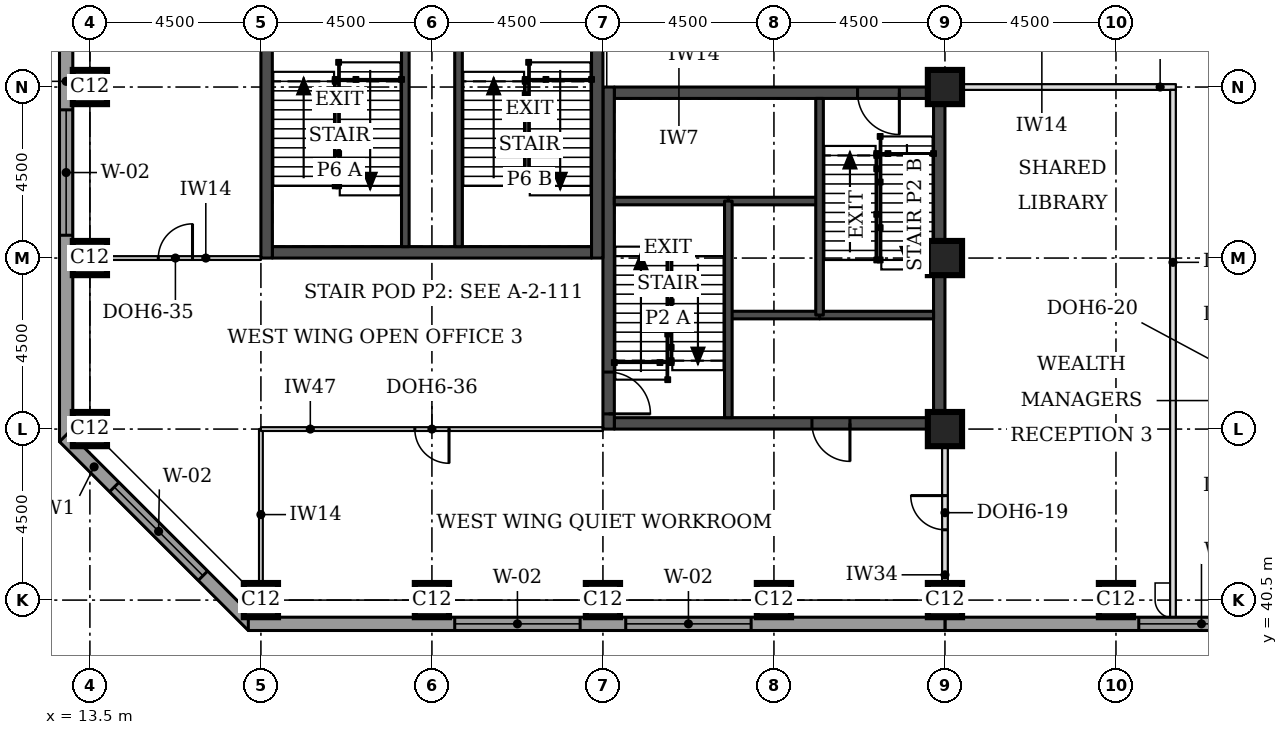
"""IFC4 building model, lengths in metres.
Left out: names, types, materials, properties, quantities, classifications, styles, units other than length and angle.
Written with IfcOpenShell. Run it as: python <this file> out.ifc"""

import sys

from ifc_helpers import new_model, si_unit, direction, frame, frame_2d, origin, origin_2d, place, context, subcontext, project, spatial, rectangle, extrude, element, fill, save


model = new_model("IFC4")
c1 = context("Model", 3, precision=1e-05, world=origin(), true_north=direction((0.0, 1.0)))
c2 = subcontext(c1, "Body", "Model", "MODEL_VIEW")
j1 = project(units=[si_unit("LENGTHUNIT", "METRE"), si_unit("PLANEANGLEUNIT", "RADIAN")], contexts=[c1])
p1 = place(None, origin())
s1 = spatial("IfcSite", under=j1, at=p1, CompositionType="ELEMENT")
p2 = place(p1, origin())
s2 = spatial("IfcBuilding", under=s1, at=p2, CompositionType="ELEMENT")
p3 = place(p2, frame((0.0, 0.0, 184.7)))
s3 = spatial("IfcBuildingStorey", under=s2, at=p3, CompositionType="ELEMENT", Elevation=184.7)
for number, where, z_axis, x_axis in (
    (1, (18.0, 40.5, 0.0), (0.0, 0.0, 1.0), (1.0, 0.0, 0.0)),
    (2, (22.5, 40.5, 0.0), (0.0, 0.0, 1.0), (1.0, 0.0, 0.0)),
    (3, (27.0, 40.5, 0.0), (0.0, 0.0, 1.0), (1.0, 0.0, 0.0)),
    (4, (31.5, 40.5, 0.0), (0.0, 0.0, 1.0), (1.0, 0.0, 0.0)),
    (5, (36.0, 40.5, 0.0), (0.0, 0.0, 1.0), (1.0, 0.0, 0.0)),
    (6, (40.5, 40.5, 0.0), (0.0, 0.0, 1.0), (1.0, 0.0, 0.0)),
    (7, (13.5, 45.0, 0.0), (0.0, 0.0, 1.0), (1.0, 0.0, 0.0)),
    (8, (36.0, 45.0, 0.0), (0.0, 0.0, 1.0), (1.0, 0.0, 0.0)),
    (9, (13.5, 49.5, 0.0), (0.0, 0.0, 1.0), (1.0, 0.0, 0.0)),
    (10, (36.0, 49.5, 0.0), (0.0, 0.0, 1.0), (1.0, 0.0, 0.0)),
    (11, (13.5, 54.0, 0.0), (0.0, 0.0, 1.0), (1.0, 0.0, 0.0)),
    (12, (36.0, 54.0, 0.0), (0.0, 0.0, 1.0), (1.0, 0.0, 0.0)),
):
    element("IfcColumn", number, at=place(p3, frame(where, z_axis=z_axis, x_axis=x_axis)), inside=s3, PredefinedType="COLUMN", context=c2, shape_type="SweptSolid", body=[
        extrude(rectangle(XDim=0.9, YDim=0.9, at=origin_2d()), origin(), (0.0, 0.0, 1.0), 3.7),
    ])
p4 = place(p3, frame((27.3, 45.15, 0.0), z_axis=(0.0, 0.0, 1.0), x_axis=(1.0, 0.0, 0.0)))
e13 = element("IfcWall", 13, at=p4, inside=s3, PredefinedType="SHEAR", context=c2, shape_type="SweptSolid", body=[
    extrude(rectangle(XDim=8.4, YDim=0.3, at=frame_2d((4.2, 0.0))), origin(), (0.0, 0.0, 1.0), 3.7),
])
p5 = place(p4, frame((5.2, 0.0, 0.0)))
e14 = element("IfcOpeningElement", 14, at=p5, cuts=e13, PredefinedType="OPENING", context=c2, shape_type="SweptSolid", body=[
    extrude(rectangle(XDim=1.0, YDim=2.1, at=frame_2d((0.5, 1.05))), frame((0.0, 0.16, 0.0), z_axis=(0.0, -1.0, 0.0), x_axis=(1.0, 0.0, 0.0)), (0.0, 0.0, 1.0), 0.32),
])
p6 = place(p3, frame((27.3, 53.85, 0.0), z_axis=(0.0, 0.0, 1.0), x_axis=(1.0, 0.0, 0.0)))
e15 = element("IfcWall", 15, at=p6, inside=s3, PredefinedType="SHEAR", context=c2, shape_type="SweptSolid", body=[
    extrude(rectangle(XDim=8.4, YDim=0.3, at=frame_2d((4.2, 0.0))), origin(), (0.0, 0.0, 1.0), 3.7),
])
p7 = place(p6, frame((6.4, 0.0, 0.0)))
e16 = element("IfcOpeningElement", 16, at=p7, cuts=e15, PredefinedType="OPENING", context=c2, shape_type="SweptSolid", body=[
    extrude(rectangle(XDim=1.1, YDim=2.1, at=frame_2d((0.55, 1.05))), frame((0.0, 0.16, 0.0), z_axis=(0.0, -1.0, 0.0), x_axis=(1.0, 0.0, 0.0)), (0.0, 0.0, 1.0), 0.32),
])
p8 = place(p3, frame((27.15, 45.0, 0.0), z_axis=(0.0, 0.0, 1.0), x_axis=(0.0, 1.0, 0.0)))
e17 = element("IfcWall", 17, at=p8, inside=s3, PredefinedType="SHEAR", context=c2, shape_type="SweptSolid", body=[
    extrude(rectangle(XDim=9.0, YDim=0.3, at=frame_2d((4.5, 0.0))), origin(), (0.0, 0.0, 1.0), 3.7),
])
p9 = place(p8, frame((0.4, 0.0, 0.0)))
e18 = element("IfcOpeningElement", 18, at=p9, cuts=e17, PredefinedType="OPENING", context=c2, shape_type="SweptSolid", body=[
    extrude(rectangle(XDim=1.1, YDim=2.1, at=frame_2d((0.55, 1.05))), frame((0.0, 0.16, 0.0), z_axis=(0.0, -1.0, 0.0), x_axis=(1.0, 0.0, 0.0)), (0.0, 0.0, 1.0), 0.32),
])
p10 = place(p3, frame((35.85, 45.0, 0.0), z_axis=(0.0, 0.0, 1.0), x_axis=(0.0, 1.0, 0.0)))
e19 = element("IfcWall", 19, at=p10, inside=s3, PredefinedType="SHEAR", context=c2, shape_type="SweptSolid", body=[
    extrude(rectangle(XDim=9.0, YDim=0.3, at=frame_2d((4.5, 0.0))), origin(), (0.0, 0.0, 1.0), 3.7),
])
p11 = place(p3, frame((18.3, 49.65, 0.0), z_axis=(0.0, 0.0, 1.0), x_axis=(1.0, 0.0, 0.0)))
e20 = element("IfcWall", 20, at=p11, inside=s3, PredefinedType="SHEAR", context=c2, shape_type="SweptSolid", body=[
    extrude(rectangle(XDim=8.4, YDim=0.3, at=frame_2d((4.2, 0.0))), origin(), (0.0, 0.0, 1.0), 3.7),
])
p12 = place(p3, frame((18.15, 49.5, 0.0), z_axis=(0.0, 0.0, 1.0), x_axis=(0.0, 1.0, 0.0)))
e21 = element("IfcWall", 21, at=p12, inside=s3, PredefinedType="SHEAR", context=c2, shape_type="SweptSolid", body=[
    extrude(rectangle(XDim=9.0, YDim=0.3, at=frame_2d((4.5, 0.0))), origin(), (0.0, 0.0, 1.0), 3.7),
])
p13 = place(p3, frame((26.85, 49.5, 0.0), z_axis=(0.0, 0.0, 1.0), x_axis=(0.0, 1.0, 0.0)))
e22 = element("IfcWall", 22, at=p13, inside=s3, PredefinedType="SHEAR", context=c2, shape_type="SweptSolid", body=[
    extrude(rectangle(XDim=9.0, YDim=0.3, at=frame_2d((4.5, 0.0))), origin(), (0.0, 0.0, 1.0), 3.7),
])
p14 = place(p13, frame((6.6, 0.0, 0.0)))
e23 = element("IfcOpeningElement", 23, at=p14, cuts=e22, PredefinedType="OPENING", context=c2, shape_type="SweptSolid", body=[
    extrude(rectangle(XDim=1.8, YDim=2.1, at=frame_2d((0.9, 1.05))), frame((0.0, 0.16, 0.0), z_axis=(0.0, -1.0, 0.0), x_axis=(1.0, 0.0, 0.0)), (0.0, 0.0, 1.0), 0.32),
])
p15 = place(p3, frame((36.0, 39.875, 0.0), z_axis=(0.0, 0.0, 1.0), x_axis=(1.0, 0.0, 0.0)))
e24 = element("IfcWall", 24, at=p15, inside=s3, PredefinedType="STANDARD", context=c2, shape_type="SweptSolid", body=[
    extrude(rectangle(XDim=36.331, YDim=0.35, at=frame_2d((18.166, 0.0))), origin(), (0.0, 0.0, 1.0), 3.525),
])
p16 = place(p15, frame((5.1, 0.0, 0.9)))
e25 = element("IfcOpeningElement", 25, at=p16, cuts=e24, PredefinedType="OPENING", context=c2, shape_type="SweptSolid", body=[
    extrude(rectangle(XDim=3.3, YDim=1.9, at=frame_2d((1.65, 0.95))), frame((0.0, 0.185, 0.0), z_axis=(0.0, -1.0, 0.0), x_axis=(1.0, 0.0, 0.0)), (0.0, 0.0, 1.0), 0.37),
])
p17 = place(p15, frame((9.6, 0.0, 0.9)))
e26 = element("IfcOpeningElement", 26, at=p17, cuts=e24, PredefinedType="OPENING", context=c2, shape_type="SweptSolid", body=[
    extrude(rectangle(XDim=3.3, YDim=1.9, at=frame_2d((1.65, 0.95))), frame((0.0, 0.185, 0.0), z_axis=(0.0, -1.0, 0.0), x_axis=(1.0, 0.0, 0.0)), (0.0, 0.0, 1.0), 0.37),
])
p18 = place(p15, frame((14.1, 0.0, 0.9)))
e27 = element("IfcOpeningElement", 27, at=p18, cuts=e24, PredefinedType="OPENING", context=c2, shape_type="SweptSolid", body=[
    extrude(rectangle(XDim=3.3, YDim=1.9, at=frame_2d((1.65, 0.95))), frame((0.0, 0.185, 0.0), z_axis=(0.0, -1.0, 0.0), x_axis=(1.0, 0.0, 0.0)), (0.0, 0.0, 1.0), 0.37),
])
p19 = place(p15, frame((18.6, 0.0, 0.9)))
e28 = element("IfcOpeningElement", 28, at=p19, cuts=e24, PredefinedType="OPENING", context=c2, shape_type="SweptSolid", body=[
    extrude(rectangle(XDim=3.3, YDim=1.9, at=frame_2d((1.65, 0.95))), frame((0.0, 0.185, 0.0), z_axis=(0.0, -1.0, 0.0), x_axis=(1.0, 0.0, 0.0)), (0.0, 0.0, 1.0), 0.37),
])
p20 = place(p15, frame((23.1, 0.0, 0.9)))
e29 = element("IfcOpeningElement", 29, at=p20, cuts=e24, PredefinedType="OPENING", context=c2, shape_type="SweptSolid", body=[
    extrude(rectangle(XDim=3.3, YDim=1.9, at=frame_2d((1.65, 0.95))), frame((0.0, 0.185, 0.0), z_axis=(0.0, -1.0, 0.0), x_axis=(1.0, 0.0, 0.0)), (0.0, 0.0, 1.0), 0.37),
])
p21 = place(p15, frame((27.6, 0.0, 0.9)))
e30 = element("IfcOpeningElement", 30, at=p21, cuts=e24, PredefinedType="OPENING", context=c2, shape_type="SweptSolid", body=[
    extrude(rectangle(XDim=3.3, YDim=1.9, at=frame_2d((1.65, 0.95))), frame((0.0, 0.185, 0.0), z_axis=(0.0, -1.0, 0.0), x_axis=(1.0, 0.0, 0.0)), (0.0, 0.0, 1.0), 0.37),
])
p22 = place(p3, frame((12.875, 58.831, 0.0), z_axis=(0.0, 0.0, 1.0), x_axis=(0.0, -1.0, 0.0)))
e31 = element("IfcWall", 31, at=p22, inside=s3, PredefinedType="STANDARD", context=c2, shape_type="SweptSolid", body=[
    extrude(rectangle(XDim=14.163, YDim=0.35, at=frame_2d((7.081, 0.0))), origin(), (0.0, 0.0, 1.0), 3.525),
])
p23 = place(p22, frame((5.431, 0.0, 0.9)))
e32 = element("IfcOpeningElement", 32, at=p23, cuts=e31, PredefinedType="OPENING", context=c2, shape_type="SweptSolid", body=[
    extrude(rectangle(XDim=3.3, YDim=1.9, at=frame_2d((1.65, 0.95))), frame((0.0, 0.185, 0.0), z_axis=(0.0, -1.0, 0.0), x_axis=(1.0, 0.0, 0.0)), (0.0, 0.0, 1.0), 0.37),
])
p24 = place(p3, frame((12.824, 44.792, 0.0), z_axis=(0.0, 0.0, 1.0), x_axis=(0.707106781187, -0.707106781187, 0.0)))
e33 = element("IfcWall", 33, at=p24, inside=s3, PredefinedType="STANDARD", context=c2, shape_type="SweptSolid", body=[
    extrude(rectangle(XDim=7.027, YDim=0.35, at=frame_2d((3.513, 0.0))), origin(), (0.0, 0.0, 1.0), 3.525),
])
p25 = place(p24, frame((1.863, 0.0, 0.9)))
e34 = element("IfcOpeningElement", 34, at=p25, cuts=e33, PredefinedType="OPENING", context=c2, shape_type="SweptSolid", body=[
    extrude(rectangle(XDim=3.3, YDim=1.9, at=frame_2d((1.65, 0.95))), frame((0.0, 0.185, 0.0), z_axis=(0.0, -1.0, 0.0), x_axis=(1.0, 0.0, 0.0)), (0.0, 0.0, 1.0), 0.37),
])
p26 = place(p3, frame((17.669, 39.875, 0.0), z_axis=(0.0, 0.0, 1.0), x_axis=(1.0, 0.0, 0.0)))
e35 = element("IfcWall", 35, at=p26, inside=s3, PredefinedType="STANDARD", context=c2, shape_type="SweptSolid", body=[
    extrude(rectangle(XDim=18.331, YDim=0.35, at=frame_2d((9.166, 0.0))), origin(), (0.0, 0.0, 1.0), 3.525),
])
p27 = place(p26, frame((5.431, 0.0, 0.9)))
e36 = element("IfcOpeningElement", 36, at=p27, cuts=e35, PredefinedType="OPENING", context=c2, shape_type="SweptSolid", body=[
    extrude(rectangle(XDim=3.3, YDim=1.9, at=frame_2d((1.65, 0.95))), frame((0.0, 0.185, 0.0), z_axis=(0.0, -1.0, 0.0), x_axis=(1.0, 0.0, 0.0)), (0.0, 0.0, 1.0), 0.37),
])
p28 = place(p26, frame((9.931, 0.0, 0.9)))
e37 = element("IfcOpeningElement", 37, at=p28, cuts=e35, PredefinedType="OPENING", context=c2, shape_type="SweptSolid", body=[
    extrude(rectangle(XDim=3.3, YDim=1.9, at=frame_2d((1.65, 0.95))), frame((0.0, 0.185, 0.0), z_axis=(0.0, -1.0, 0.0), x_axis=(1.0, 0.0, 0.0)), (0.0, 0.0, 1.0), 0.37),
])
p29 = place(p3, frame((36.45, 54.0, 0.0), z_axis=(0.0, 0.0, 1.0), x_axis=(1.0, 0.0, 0.0)))
e38 = element("IfcWall", 38, at=p29, inside=s3, PredefinedType="PARTITIONING", context=c2, shape_type="SweptSolid", body=[
    extrude(rectangle(XDim=5.625, YDim=0.15, at=frame_2d((2.812, 0.0))), origin(), (0.0, 0.0, 1.0), 3.55),
])
p30 = place(p3, frame((42.0, 40.05, 0.0), z_axis=(0.0, 0.0, 1.0), x_axis=(0.0, 1.0, 0.0)))
e39 = element("IfcWall", 39, at=p30, inside=s3, PredefinedType="PARTITIONING", context=c2, shape_type="SweptSolid", body=[
    extrude(rectangle(XDim=13.875, YDim=0.15, at=frame_2d((6.938, 0.0))), origin(), (0.0, 0.0, 1.0), 3.55),
])
p31 = place(p3, frame((36.0, 40.95, 0.0), z_axis=(0.0, 0.0, 1.0), x_axis=(0.0, 1.0, 0.0)))
e40 = element("IfcWall", 40, at=p31, inside=s3, PredefinedType="PARTITIONING", context=c2, shape_type="SweptSolid", body=[
    extrude(rectangle(XDim=3.63, YDim=0.15, at=frame_2d((1.815, 0.0))), origin(), (0.0, 0.0, 1.0), 2.8),
])
p32 = place(p31, frame((1.4, 0.0, 0.0)))
e41 = element("IfcOpeningElement", 41, at=p32, cuts=e40, PredefinedType="OPENING", context=c2, shape_type="SweptSolid", body=[
    extrude(rectangle(XDim=0.9, YDim=2.1, at=frame_2d((0.45, 1.05))), frame((0.0, 0.085, 0.0), z_axis=(0.0, -1.0, 0.0), x_axis=(1.0, 0.0, 0.0)), (0.0, 0.0, 1.0), 0.17),
])
p33 = place(p3, frame((13.5, 49.5, 0.0), z_axis=(0.0, 0.0, 1.0), x_axis=(1.0, 0.0, 0.0)))
e42 = element("IfcWall", 42, at=p33, inside=s3, PredefinedType="PARTITIONING", context=c2, shape_type="SweptSolid", body=[
    extrude(rectangle(XDim=4.5, YDim=0.1, at=frame_2d((2.25, 0.0))), origin(), (0.0, 0.0, 1.0), 3.55),
])
p34 = place(p33, frame((1.8, 0.0, 0.0)))
e43 = element("IfcOpeningElement", 43, at=p34, cuts=e42, PredefinedType="OPENING", context=c2, shape_type="SweptSolid", body=[
    extrude(rectangle(XDim=0.9, YDim=2.1, at=frame_2d((0.45, 1.05))), frame((0.0, 0.06, 0.0), z_axis=(0.0, -1.0, 0.0), x_axis=(1.0, 0.0, 0.0)), (0.0, 0.0, 1.0), 0.12),
])
p35 = place(p3, frame((18.0, 40.5, 0.0), z_axis=(0.0, 0.0, 1.0), x_axis=(0.0, 1.0, 0.0)))
e44 = element("IfcWall", 44, at=p35, inside=s3, PredefinedType="PARTITIONING", context=c2, shape_type="SweptSolid", body=[
    extrude(rectangle(XDim=4.5, YDim=0.1, at=frame_2d((2.25, 0.0))), origin(), (0.0, 0.0, 1.0), 3.55),
])
p36 = place(p3, frame((18.0, 45.0, 0.0), z_axis=(0.0, 0.0, 1.0), x_axis=(1.0, 0.0, 0.0)))
e45 = element("IfcWall", 45, at=p36, inside=s3, PredefinedType="PARTITIONING", context=c2, shape_type="SweptSolid", body=[
    extrude(rectangle(XDim=9.0, YDim=0.1, at=frame_2d((4.5, 0.0))), origin(), (0.0, 0.0, 1.0), 2.55),
])
p37 = place(p36, frame((4.05, 0.0, 0.0)))
e46 = element("IfcOpeningElement", 46, at=p37, cuts=e45, PredefinedType="OPENING", context=c2, shape_type="SweptSolid", body=[
    extrude(rectangle(XDim=0.9, YDim=2.1, at=frame_2d((0.45, 1.05))), frame((0.0, 0.06, 0.0), z_axis=(0.0, -1.0, 0.0), x_axis=(1.0, 0.0, 0.0)), (0.0, 0.0, 1.0), 0.12),
])
p38 = place(p3, frame((30.3, 48.0, 0.0), z_axis=(0.0, 0.0, 1.0), x_axis=(1.0, 0.0, 0.0)))
e47 = element("IfcWall", 47, at=p38, inside=s3, PredefinedType="SOLIDWALL", context=c2, shape_type="SweptSolid", body=[
    extrude(rectangle(XDim=2.4, YDim=0.2, at=frame_2d((1.2, 0.0))), origin(), (0.0, 0.0, 1.0), 3.55),
])
p39 = place(p3, frame((32.7, 48.0, 0.0), z_axis=(0.0, 0.0, 1.0), x_axis=(1.0, 0.0, 0.0)))
e48 = element("IfcWall", 48, at=p39, inside=s3, PredefinedType="SOLIDWALL", context=c2, shape_type="SweptSolid", body=[
    extrude(rectangle(XDim=3.0, YDim=0.2, at=frame_2d((1.5, 0.0))), origin(), (0.0, 0.0, 1.0), 3.55),
])
p40 = place(p3, frame((30.3, 51.0, 0.0), z_axis=(0.0, 0.0, 1.0), x_axis=(1.0, 0.0, 0.0)))
e49 = element("IfcWall", 49, at=p40, inside=s3, PredefinedType="SOLIDWALL", context=c2, shape_type="SweptSolid", body=[
    extrude(rectangle(XDim=2.4, YDim=0.2, at=frame_2d((1.2, 0.0))), origin(), (0.0, 0.0, 1.0), 3.7),
])
p41 = place(p3, frame((27.3, 51.0, 0.0), z_axis=(0.0, 0.0, 1.0), x_axis=(1.0, 0.0, 0.0)))
e50 = element("IfcWall", 50, at=p41, inside=s3, PredefinedType="SOLIDWALL", context=c2, shape_type="SweptSolid", body=[
    extrude(rectangle(XDim=3.0, YDim=0.2, at=frame_2d((1.5, 0.0))), origin(), (0.0, 0.0, 1.0), 3.55),
])
for number, where, z_axis, x_axis in (
    (51, (30.3, 45.3, 0.0), (0.0, 0.0, 1.0), (0.0, 1.0, 0.0)),
    (52, (32.7, 48.0, 0.0), (0.0, 0.0, 1.0), (0.0, 1.0, 0.0)),
):
    element("IfcWall", number, at=place(p3, frame(where, z_axis=z_axis, x_axis=x_axis)), inside=s3, PredefinedType="SOLIDWALL", context=c2, shape_type="SweptSolid", body=[
        extrude(rectangle(XDim=5.7, YDim=0.2, at=frame_2d((2.85, 0.0))), origin(), (0.0, 0.0, 1.0), 3.55),
    ])
for number, where, z_axis, x_axis in (
    (53, (21.8, 49.8, 0.0), (0.0, 0.0, 1.0), (0.0, 1.0, 0.0)),
    (54, (23.2, 49.8, 0.0), (0.0, 0.0, 1.0), (0.0, 1.0, 0.0)),
):
    element("IfcWall", number, at=place(p3, frame(where, z_axis=z_axis, x_axis=x_axis)), inside=s3, PredefinedType="SOLIDWALL", context=c2, shape_type="SweptSolid", body=[
        extrude(rectangle(XDim=6.05, YDim=0.2, at=frame_2d((3.025, 0.0))), origin(), (0.0, 0.0, 1.0), 3.55),
    ])
p42 = place(p16, origin())
e55 = element("IfcWindow", 55, at=p42, inside=s3, PartitioningType="SINGLE_PANEL", PredefinedType="WINDOW", context=c2, shape_type="SweptSolid", body=[
    extrude(rectangle(XDim=3.3, YDim=1.9, at=frame_2d((1.65, 0.95))), frame((0.0, 0.085, 0.0), z_axis=(0.0, -1.0, 0.0), x_axis=(1.0, 0.0, 0.0)), (0.0, 0.0, 1.0), 0.06),
])
fill(e25, e55)
p43 = place(p23, origin())
e56 = element("IfcWindow", 56, at=p43, inside=s3, PartitioningType="SINGLE_PANEL", PredefinedType="WINDOW", context=c2, shape_type="SweptSolid", body=[
    extrude(rectangle(XDim=3.3, YDim=1.9, at=frame_2d((1.65, 0.95))), frame((0.0, 0.085, 0.0), z_axis=(0.0, -1.0, 0.0), x_axis=(1.0, 0.0, 0.0)), (0.0, 0.0, 1.0), 0.06),
])
fill(e32, e56)
p44 = place(p25, origin())
e57 = element("IfcWindow", 57, at=p44, inside=s3, PartitioningType="SINGLE_PANEL", PredefinedType="WINDOW", context=c2, shape_type="SweptSolid", body=[
    extrude(rectangle(XDim=3.3, YDim=1.9, at=frame_2d((1.65, 0.95))), frame((0.0, 0.085, 0.0), z_axis=(0.0, -1.0, 0.0), x_axis=(1.0, 0.0, 0.0)), (0.0, 0.0, 1.0), 0.06),
])
fill(e34, e57)
p45 = place(p27, origin())
e58 = element("IfcWindow", 58, at=p45, inside=s3, PartitioningType="SINGLE_PANEL", PredefinedType="WINDOW", context=c2, shape_type="SweptSolid", body=[
    extrude(rectangle(XDim=3.3, YDim=1.9, at=frame_2d((1.65, 0.95))), frame((0.0, 0.085, 0.0), z_axis=(0.0, -1.0, 0.0), x_axis=(1.0, 0.0, 0.0)), (0.0, 0.0, 1.0), 0.06),
])
fill(e36, e58)
p46 = place(p28, origin())
e59 = element("IfcWindow", 59, at=p46, inside=s3, PartitioningType="SINGLE_PANEL", PredefinedType="WINDOW", context=c2, shape_type="SweptSolid", body=[
    extrude(rectangle(XDim=3.3, YDim=1.9, at=frame_2d((1.65, 0.95))), frame((0.0, 0.085, 0.0), z_axis=(0.0, -1.0, 0.0), x_axis=(1.0, 0.0, 0.0)), (0.0, 0.0, 1.0), 0.06),
])
fill(e37, e59)
p47 = place(p32, origin())
e60 = element("IfcDoor", 60, at=p47, inside=s3, OperationType="SINGLE_SWING_RIGHT", PredefinedType="DOOR", context=c2, shape_type="SweptSolid", body=[
    extrude(rectangle(XDim=0.9, YDim=2.1, at=frame_2d((0.45, 1.05))), frame((0.0, 0.025, 0.0), z_axis=(0.0, -1.0, 0.0), x_axis=(1.0, 0.0, 0.0)), (0.0, 0.0, 1.0), 0.05),
])
fill(e41, e60)
p48 = place(p34, origin())
e61 = element("IfcDoor", 61, at=p48, inside=s3, OperationType="SINGLE_SWING_RIGHT", PredefinedType="DOOR", context=c2, shape_type="SweptSolid", body=[
    extrude(rectangle(XDim=0.9, YDim=2.1, at=frame_2d((0.45, 1.05))), frame((0.0, 0.025, 0.0), z_axis=(0.0, -1.0, 0.0), x_axis=(1.0, 0.0, 0.0)), (0.0, 0.0, 1.0), 0.05),
])
fill(e43, e61)
p49 = place(p37, frame((0.9, 0.0, 0.0), z_axis=(0.0, 0.0, 1.0), x_axis=(-1.0, 0.0, 0.0)))
e62 = element("IfcDoor", 62, at=p49, inside=s3, OperationType="SINGLE_SWING_LEFT", PredefinedType="DOOR", context=c2, shape_type="SweptSolid", body=[
    extrude(rectangle(XDim=0.9, YDim=2.1, at=frame_2d((0.45, 1.05))), frame((0.0, 0.025, 0.0), z_axis=(0.0, -1.0, 0.0), x_axis=(1.0, 0.0, 0.0)), (0.0, 0.0, 1.0), 0.05),
])
fill(e46, e62)
p50 = place(p9, frame((1.1, 0.0, 0.0), z_axis=(0.0, 0.0, 1.0), x_axis=(-1.0, 0.0, 0.0)))
e63 = element("IfcDoor", 63, at=p50, inside=s3, OperationType="SINGLE_SWING_RIGHT", PredefinedType="DOOR", context=c2, shape_type="SweptSolid", body=[
    extrude(rectangle(XDim=1.1, YDim=2.1, at=frame_2d((0.55, 1.05))), frame((0.0, 0.025, 0.0), z_axis=(0.0, -1.0, 0.0), x_axis=(1.0, 0.0, 0.0)), (0.0, 0.0, 1.0), 0.05),
])
fill(e18, e63)
p51 = place(p7, frame((1.1, 0.0, 0.0), z_axis=(0.0, 0.0, 1.0), x_axis=(-1.0, 0.0, 0.0)))
e64 = element("IfcDoor", 64, at=p51, inside=s3, OperationType="SINGLE_SWING_LEFT", PredefinedType="DOOR", context=c2, shape_type="SweptSolid", body=[
    extrude(rectangle(XDim=1.1, YDim=2.1, at=frame_2d((0.55, 1.05))), frame((0.0, 0.025, 0.0), z_axis=(0.0, -1.0, 0.0), x_axis=(1.0, 0.0, 0.0)), (0.0, 0.0, 1.0), 0.05),
])
fill(e16, e64)
p52 = place(p5, frame((1.0, 0.0, 0.0), z_axis=(0.0, 0.0, 1.0), x_axis=(-1.0, 0.0, 0.0)))
e65 = element("IfcDoor", 65, at=p52, inside=s3, OperationType="SINGLE_SWING_LEFT", PredefinedType="DOOR", context=c2, shape_type="SweptSolid", body=[
    extrude(rectangle(XDim=1.0, YDim=2.1, at=frame_2d((0.5, 1.05))), frame((0.0, 0.025, 0.0), z_axis=(0.0, -1.0, 0.0), x_axis=(1.0, 0.0, 0.0)), (0.0, 0.0, 1.0), 0.05),
])
fill(e14, e65)
save(model, sys.argv[1])
